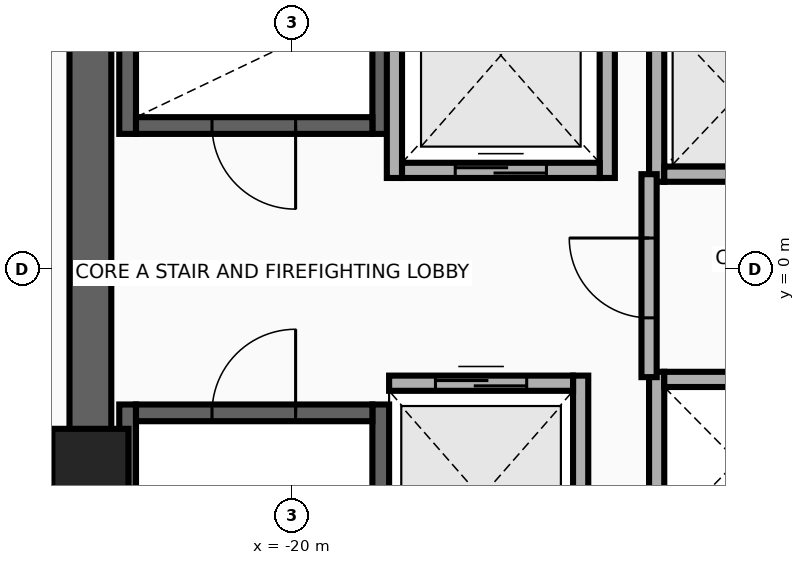
"""IFC4 building model, lengths in metres.
Left out: names, types, materials, properties, quantities, classifications, styles, units other than length and angle.
Written with IfcOpenShell. Run it as: python <this file> out.ifc"""

import sys

from ifc_helpers import new_model, si_unit, direction, frame, frame_2d, origin, origin_2d, place, context, subcontext, project, spatial, rectangle, extrude, source, transform, mapped, element, fill, save


model = new_model("IFC4")
c1 = context("Model", 3, precision=1e-05, world=origin(), true_north=direction((0.0, 1.0)))
c2 = subcontext(c1, "Body", "Model", "MODEL_VIEW")
j1 = project(units=[si_unit("LENGTHUNIT", "METRE"), si_unit("PLANEANGLEUNIT", "RADIAN")], contexts=[c1])
p1 = place(None, origin())
s1 = spatial("IfcSite", under=j1, at=p1, CompositionType="ELEMENT")
p2 = place(p1, origin())
s2 = spatial("IfcBuilding", under=s1, at=p2, CompositionType="ELEMENT")
p3 = place(p2, frame((0.0, 0.0, 176.55)))
s3 = spatial("IfcBuildingStorey", under=s2, at=p3, CompositionType="ELEMENT", Elevation=176.55)
for number, where, z_axis, x_axis in (
    (1, (-22.16, 1.78, 0.0), (0.0, 0.0, 1.0), (0.0, 1.0, 0.0)),
    (2, (-18.83, 1.78, 0.0), (0.0, 0.0, 1.0), (0.0, 1.0, 0.0)),
):
    element("IfcWall", number, at=place(p3, frame(where, z_axis=z_axis, x_axis=x_axis)), inside=s3, PredefinedType="SHEAR", context=c2, shape_type="SweptSolid", body=[
        extrude(rectangle(XDim=8.745, YDim=0.22, at=frame_2d((4.373, 0.0))), origin(), (0.0, 0.0, 1.0), 3.63),
    ])
p4 = place(p3, frame((-22.05, 1.89, 0.0), z_axis=(0.0, 0.0, 1.0), x_axis=(1.0, 0.0, 0.0)))
e3 = element("IfcWall", 3, at=p4, inside=s3, PredefinedType="SHEAR", context=c2, shape_type="SweptSolid", body=[
    extrude(rectangle(XDim=3.11, YDim=0.22, at=frame_2d((1.555, 0.0))), origin(), (0.0, 0.0, 1.0), 3.63),
])
p5 = place(p4, frame((1.0, 0.0, 0.0)))
e4 = element("IfcOpeningElement", 4, at=p5, cuts=e3, PredefinedType="OPENING", context=c2, shape_type="SweptSolid", body=[
    extrude(rectangle(XDim=1.1, YDim=2.15, at=frame_2d((0.55, 1.075))), frame((0.0, 0.125, 0.0), z_axis=(0.0, -1.0, 0.0), x_axis=(1.0, 0.0, 0.0)), (0.0, 0.0, 1.0), 0.25),
])
for number, where, z_axis, x_axis in (
    (5, (-22.16, -10.525, 0.0), (0.0, 0.0, 1.0), (0.0, 1.0, 0.0)),
    (6, (-18.83, -10.525, 0.0), (0.0, 0.0, 1.0), (0.0, 1.0, 0.0)),
):
    element("IfcWall", number, at=place(p3, frame(where, z_axis=z_axis, x_axis=x_axis)), inside=s3, PredefinedType="SHEAR", context=c2, shape_type="SweptSolid", body=[
        extrude(rectangle(XDim=8.745, YDim=0.22, at=frame_2d((4.373, 0.0))), origin(), (0.0, 0.0, 1.0), 3.63),
    ])
p6 = place(p3, frame((-22.05, -1.89, 0.0), z_axis=(0.0, 0.0, 1.0), x_axis=(1.0, 0.0, 0.0)))
e7 = element("IfcWall", 7, at=p6, inside=s3, PredefinedType="SHEAR", context=c2, shape_type="SweptSolid", body=[
    extrude(rectangle(XDim=3.11, YDim=0.22, at=frame_2d((1.555, 0.0))), origin(), (0.0, 0.0, 1.0), 3.63),
])
p7 = place(p6, frame((1.0, 0.0, 0.0)))
e8 = element("IfcOpeningElement", 8, at=p7, cuts=e7, PredefinedType="OPENING", context=c2, shape_type="SweptSolid", body=[
    extrude(rectangle(XDim=1.1, YDim=2.15, at=frame_2d((0.55, 1.075))), frame((0.0, 0.125, 0.0), z_axis=(0.0, -1.0, 0.0), x_axis=(1.0, 0.0, 0.0)), (0.0, 0.0, 1.0), 0.25),
])
p8 = place(p3, frame((-22.65, -11.075, 0.0), z_axis=(0.0, 0.0, 1.0), x_axis=(0.0, 1.0, 0.0)))
e9 = element("IfcWall", 9, at=p8, inside=s3, PredefinedType="SHEAR", context=c2, shape_type="SweptSolid", body=[
    extrude(rectangle(XDim=22.15, YDim=0.55, at=frame_2d((11.075, 0.0))), origin(), (0.0, 0.0, 1.0), 3.63),
])
m1 = source(origin(), c2, "Body", "SweptSolid", [
    extrude(rectangle(XDim=1.0, YDim=1.0, at=origin_2d()), origin(), (0.0, 0.0, 1.0), 3.95),
])
p9 = place(p3, frame((-22.65, -2.6, 0.0), z_axis=(0.0, 0.0, 1.0), x_axis=(1.0, 0.0, 0.0)))
e10 = element("IfcColumn", 10, at=p9, inside=s3, PredefinedType="COLUMN", context=c2, shape_type="MappedRepresentation", body=[
    mapped(m1, transform((0.0, 0.0, 0.0), x_axis=(1.0, 0.0, 0.0), y_axis=(0.0, 1.0, 0.0), z_axis=(0.0, 0.0, 1.0), scale=1.0)),
])
for number, where, z_axis, x_axis in (
    (11, (-18.65, 1.2, 0.0), (0.0, 0.0, 1.0), (0.0, 1.0, 0.0)),
    (12, (-15.85, 1.2, 0.0), (0.0, 0.0, 1.0), (0.0, 1.0, 0.0)),
):
    element("IfcWall", number, at=place(p3, frame(where, z_axis=z_axis, x_axis=x_axis)), inside=s3, PredefinedType="MOVABLE", context=c2, shape_type="SweptSolid", body=[
        extrude(rectangle(XDim=3.225, YDim=0.2, at=frame_2d((1.613, 0.0))), origin(), (0.0, 0.0, 1.0), 3.63),
    ])
p10 = place(p3, frame((-18.55, 1.3, 0.0), z_axis=(0.0, 0.0, 1.0), x_axis=(1.0, 0.0, 0.0)))
e13 = element("IfcWall", 13, at=p10, inside=s3, PredefinedType="MOVABLE", context=c2, shape_type="SweptSolid", body=[
    extrude(rectangle(XDim=2.6, YDim=0.2, at=frame_2d((1.3, 0.0))), origin(), (0.0, 0.0, 1.0), 3.63),
])
p11 = place(p10, frame((0.7, 0.0, 0.0)))
e14 = element("IfcOpeningElement", 14, at=p11, cuts=e13, PredefinedType="OPENING", context=c2, shape_type="SweptSolid", body=[
    extrude(rectangle(XDim=1.2, YDim=2.1, at=frame_2d((0.6, 1.05))), frame((0.0, 0.115, 0.0), z_axis=(0.0, -1.0, 0.0), x_axis=(1.0, 0.0, 0.0)), (0.0, 0.0, 1.0), 0.23),
])
p12 = place(p3, frame((-16.2, -4.6, 0.0), z_axis=(0.0, 0.0, 1.0), x_axis=(0.0, 1.0, 0.0)))
e15 = element("IfcWall", 15, at=p12, inside=s3, PredefinedType="MOVABLE", context=c2, shape_type="SweptSolid", body=[
    extrude(rectangle(XDim=3.2, YDim=0.2, at=frame_2d((1.6, 0.0))), origin(), (0.0, 0.0, 1.0), 3.63),
])
p13 = place(p3, frame((-18.72, -1.5, 0.0), z_axis=(0.0, 0.0, 1.0), x_axis=(1.0, 0.0, 0.0)))
e16 = element("IfcWall", 16, at=p13, inside=s3, PredefinedType="MOVABLE", context=c2, shape_type="SweptSolid", body=[
    extrude(rectangle(XDim=2.42, YDim=0.2, at=frame_2d((1.21, 0.0))), origin(), (0.0, 0.0, 1.0), 3.63),
])
p14 = place(p13, frame((0.61, 0.0, 0.0)))
e17 = element("IfcOpeningElement", 17, at=p14, cuts=e16, PredefinedType="OPENING", context=c2, shape_type="SweptSolid", body=[
    extrude(rectangle(XDim=1.2, YDim=2.1, at=frame_2d((0.6, 1.05))), frame((0.0, 0.115, 0.0), z_axis=(0.0, -1.0, 0.0), x_axis=(1.0, 0.0, 0.0)), (0.0, 0.0, 1.0), 0.23),
])
p15 = place(p3, frame((-15.2, 1.15, 0.0), z_axis=(0.0, 0.0, 1.0), x_axis=(0.0, 1.0, 0.0)))
e18 = element("IfcWall", 18, at=p15, inside=s3, PredefinedType="MOVABLE", context=c2, shape_type="SweptSolid", body=[
    extrude(rectangle(XDim=2.25, YDim=0.2, at=frame_2d((1.125, 0.0))), origin(), (0.0, 0.0, 1.0), 3.63),
])
p16 = place(p3, frame((-15.1, 1.25, 0.0), z_axis=(0.0, 0.0, 1.0), x_axis=(1.0, 0.0, 0.0)))
e19 = element("IfcWall", 19, at=p16, inside=s3, PredefinedType="MOVABLE", context=c2, shape_type="SweptSolid", body=[
    extrude(rectangle(XDim=1.92, YDim=0.2, at=frame_2d((0.96, 0.0))), origin(), (0.0, 0.0, 1.0), 3.63),
])
p17 = place(p3, frame((-15.2, -3.7, 0.0), z_axis=(0.0, 0.0, 1.0), x_axis=(0.0, 1.0, 0.0)))
e20 = element("IfcWall", 20, at=p17, inside=s3, PredefinedType="MOVABLE", context=c2, shape_type="SweptSolid", body=[
    extrude(rectangle(XDim=2.35, YDim=0.2, at=frame_2d((1.175, 0.0))), origin(), (0.0, 0.0, 1.0), 3.63),
])
p18 = place(p3, frame((-15.1, -1.45, 0.0), z_axis=(0.0, 0.0, 1.0), x_axis=(1.0, 0.0, 0.0)))
e21 = element("IfcWall", 21, at=p18, inside=s3, PredefinedType="MOVABLE", context=c2, shape_type="SweptSolid", body=[
    extrude(rectangle(XDim=1.92, YDim=0.2, at=frame_2d((0.96, 0.0))), origin(), (0.0, 0.0, 1.0), 3.63),
])
p19 = place(p3, frame((-15.3, -1.42, 0.0), z_axis=(0.0, 0.0, 1.0), x_axis=(0.0, 1.0, 0.0)))
e22 = element("IfcWall", 22, at=p19, inside=s3, PredefinedType="PARTITIONING", context=c2, shape_type="SweptSolid", body=[
    extrude(rectangle(XDim=2.67, YDim=0.2, at=frame_2d((1.335, 0.0))), origin(), (0.0, 0.0, 1.0), 3.63),
])
p20 = place(p19, frame((0.78, 0.0, 0.0)))
e23 = element("IfcOpeningElement", 23, at=p20, cuts=e22, PredefinedType="OPENING", context=c2, shape_type="SweptSolid", body=[
    extrude(rectangle(XDim=1.05, YDim=2.15, at=frame_2d((0.525, 1.075))), frame((0.0, 0.115, 0.0), z_axis=(0.0, -1.0, 0.0), x_axis=(1.0, 0.0, 0.0)), (0.0, 0.0, 1.0), 0.23),
])
p21 = place(p11, origin())
e24 = element("IfcDoor", 24, at=p21, inside=s3, OperationType="DOUBLE_DOOR_SLIDING", PredefinedType="DOOR", context=c2, shape_type="SweptSolid", body=[
    extrude(rectangle(XDim=1.2, YDim=2.1, at=frame_2d((0.6, 1.05))), frame((0.0, 0.025, 0.0), z_axis=(0.0, -1.0, 0.0), x_axis=(1.0, 0.0, 0.0)), (0.0, 0.0, 1.0), 0.05),
])
fill(e14, e24)
p22 = place(p14, origin())
e25 = element("IfcDoor", 25, at=p22, inside=s3, OperationType="DOUBLE_DOOR_SLIDING", PredefinedType="DOOR", context=c2, shape_type="SweptSolid", body=[
    extrude(rectangle(XDim=1.2, YDim=2.1, at=frame_2d((0.6, 1.05))), frame((0.0, 0.025, 0.0), z_axis=(0.0, -1.0, 0.0), x_axis=(1.0, 0.0, 0.0)), (0.0, 0.0, 1.0), 0.05),
])
fill(e17, e25)
p23 = place(p20, origin())
e26 = element("IfcDoor", 26, at=p23, inside=s3, OperationType="SINGLE_SWING_RIGHT", PredefinedType="DOOR", context=c2, shape_type="SweptSolid", body=[
    extrude(rectangle(XDim=1.05, YDim=2.15, at=frame_2d((0.525, 1.075))), frame((0.0, 0.025, 0.0), z_axis=(0.0, -1.0, 0.0), x_axis=(1.0, 0.0, 0.0)), (0.0, 0.0, 1.0), 0.05),
])
fill(e23, e26)
p24 = place(p5, frame((1.1, 0.0, 0.0), z_axis=(0.0, 0.0, 1.0), x_axis=(-1.0, 0.0, 0.0)))
e27 = element("IfcDoor", 27, at=p24, inside=s3, OperationType="SINGLE_SWING_LEFT", PredefinedType="DOOR", context=c2, shape_type="SweptSolid", body=[
    extrude(rectangle(XDim=1.1, YDim=2.15, at=frame_2d((0.55, 1.075))), frame((0.0, 0.025, 0.0), z_axis=(0.0, -1.0, 0.0), x_axis=(1.0, 0.0, 0.0)), (0.0, 0.0, 1.0), 0.05),
])
fill(e4, e27)
p25 = place(p7, origin())
e28 = element("IfcDoor", 28, at=p25, inside=s3, OperationType="SINGLE_SWING_RIGHT", PredefinedType="DOOR", context=c2, shape_type="SweptSolid", body=[
    extrude(rectangle(XDim=1.1, YDim=2.15, at=frame_2d((0.55, 1.075))), frame((0.0, 0.025, 0.0), z_axis=(0.0, -1.0, 0.0), x_axis=(1.0, 0.0, 0.0)), (0.0, 0.0, 1.0), 0.05),
])
fill(e8, e28)
save(model, sys.argv[1])
